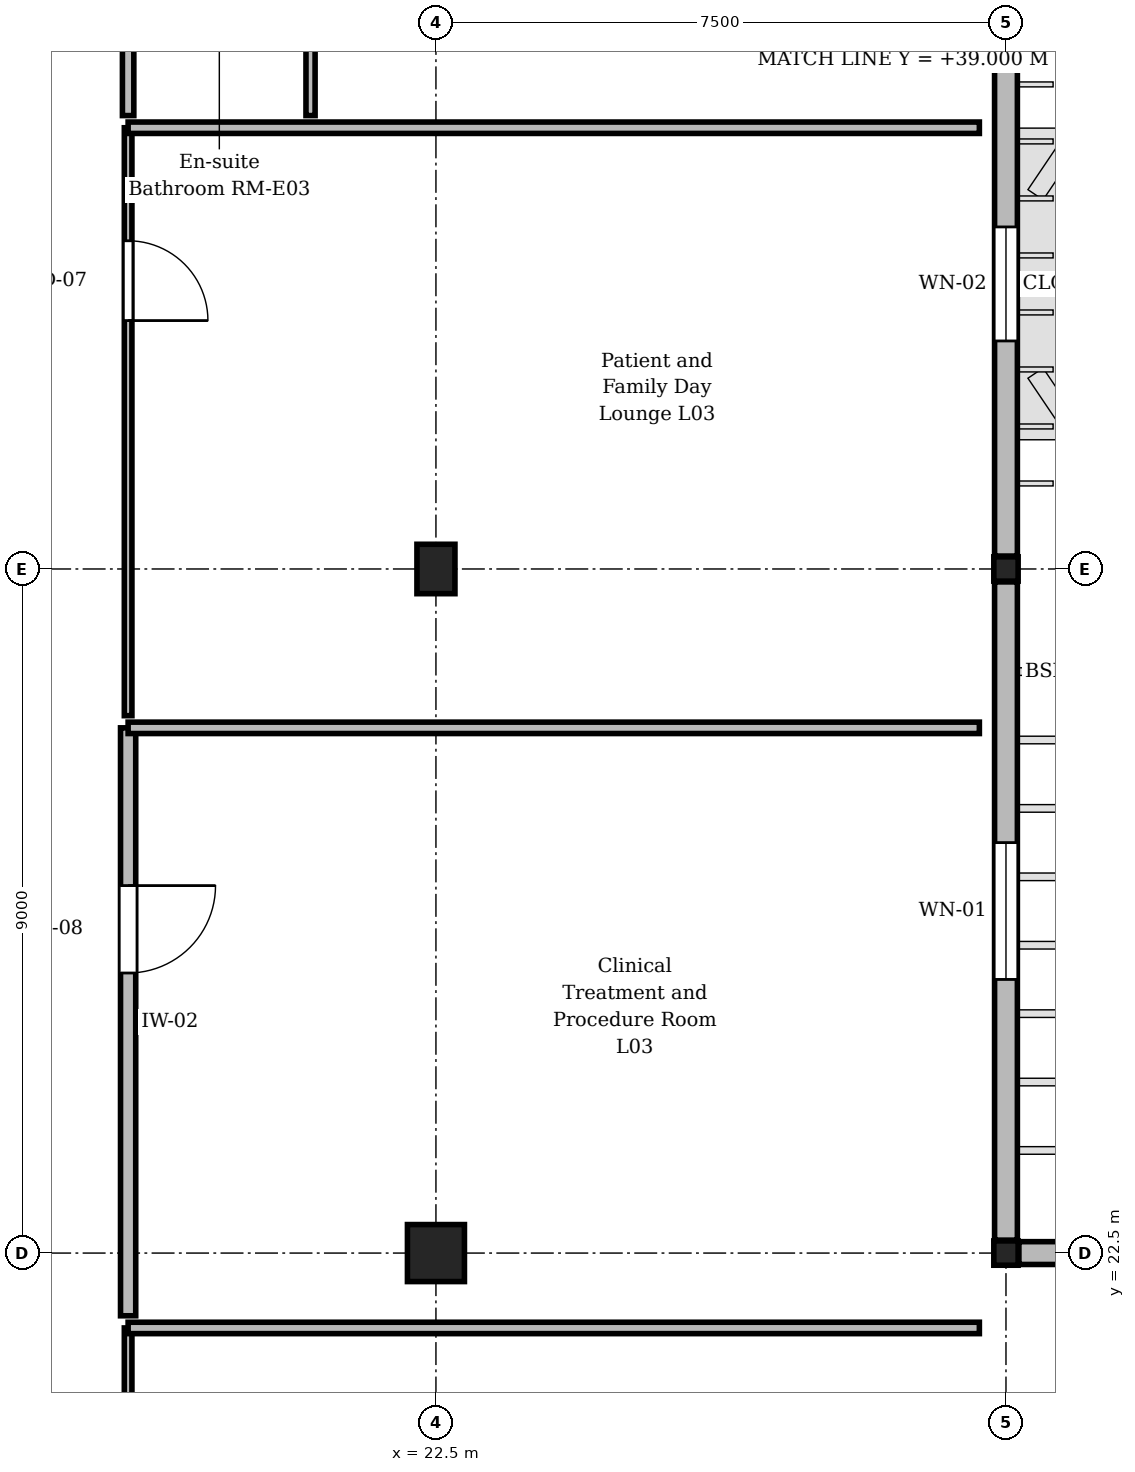
"""IFC4 building model, lengths in metres.
Left out: names, types, materials, properties, quantities, classifications, styles, units other than length and angle.
Written with IfcOpenShell. Run it as: python <this file> out.ifc"""

import sys

from ifc_helpers import new_model, si_unit, direction, frame, frame_2d, origin, origin_2d, place, context, subcontext, project, spatial, rectangle, extrude, element, fill, save


model = new_model("IFC4")
c1 = context("Model", 3, precision=1e-05, world=origin(), true_north=direction((0.0, 1.0)))
c2 = subcontext(c1, "Body", "Model", "MODEL_VIEW")
j1 = project(units=[si_unit("LENGTHUNIT", "METRE"), si_unit("PLANEANGLEUNIT", "RADIAN")], contexts=[c1])
p1 = place(None, origin())
s1 = spatial("IfcSite", under=j1, at=p1, CompositionType="ELEMENT")
p2 = place(p1, origin())
s2 = spatial("IfcBuilding", under=s1, at=p2, CompositionType="ELEMENT")
p3 = place(p2, frame((0.0, 0.0, 14.1)))
s3 = spatial("IfcBuildingStorey", under=s2, at=p3, CompositionType="ELEMENT", Elevation=14.1)
p4 = place(p3, frame((22.5, 22.5, 0.0), z_axis=(0.0, 0.0, 1.0), x_axis=(1.0, 0.0, 0.0)))
e1 = element("IfcColumn", 1, at=p4, inside=s3, PredefinedType="COLUMN", context=c2, shape_type="SweptSolid", body=[
    extrude(rectangle(XDim=0.75, YDim=0.75, at=origin_2d()), origin(), (0.0, 0.0, 1.0), 3.75),
])
p5 = place(p3, frame((22.5, 31.5, 0.0), z_axis=(0.0, 0.0, 1.0), x_axis=(1.0, 0.0, 0.0)))
e2 = element("IfcColumn", 2, at=p5, inside=s3, PredefinedType="COLUMN", context=c2, shape_type="SweptSolid", body=[
    extrude(rectangle(XDim=0.5, YDim=0.65, at=origin_2d()), origin(), (0.0, 0.0, 1.0), 3.75),
])
for number, where, z_axis, x_axis in (
    (3, (30.0, 22.5, 0.0), (0.0, 0.0, 1.0), (1.0, 0.0, 0.0)),
    (4, (30.0, 31.5, 0.0), (0.0, 0.0, 1.0), (1.0, 0.0, 0.0)),
):
    element("IfcColumn", number, at=place(p3, frame(where, z_axis=z_axis, x_axis=x_axis)), inside=s3, PredefinedType="COLUMN", context=c2, shape_type="SweptSolid", body=[
        extrude(rectangle(XDim=0.32, YDim=0.32, at=origin_2d()), origin(), (0.0, 0.0, 1.0), 3.75),
    ])
p6 = place(p3, frame((30.0, 31.33, 0.0), z_axis=(0.0, 0.0, 1.0), x_axis=(0.0, -1.0, 0.0)))
e5 = element("IfcWall", 5, at=p6, inside=s3, PredefinedType="STANDARD", context=c2, shape_type="SweptSolid", body=[
    extrude(rectangle(XDim=8.66, YDim=0.3, at=frame_2d((4.33, 0.0))), origin(), (0.0, 0.0, 1.0), 2.92),
])
p7 = place(p6, frame((3.43, 0.0, 0.9)))
e6 = element("IfcOpeningElement", 6, at=p7, cuts=e5, PredefinedType="OPENING", context=c2, shape_type="SweptSolid", body=[
    extrude(rectangle(XDim=1.8, YDim=1.74, at=frame_2d((0.9, 0.87))), frame((0.0, 0.16, 0.0), z_axis=(0.0, -1.0, 0.0), x_axis=(1.0, 0.0, 0.0)), (0.0, 0.0, 1.0), 0.32),
])
p8 = place(p3, frame((30.0, 38.83, 0.0), z_axis=(0.0, 0.0, 1.0), x_axis=(0.0, -1.0, 0.0)))
e7 = element("IfcWall", 7, at=p8, inside=s3, PredefinedType="STANDARD", context=c2, shape_type="SweptSolid", body=[
    extrude(rectangle(XDim=7.16, YDim=0.3, at=frame_2d((3.58, 0.0))), origin(), (0.0, 0.0, 1.0), 2.87),
])
p9 = place(p8, frame((2.83, 0.0, 0.9)))
e8 = element("IfcOpeningElement", 8, at=p9, cuts=e7, PredefinedType="OPENING", context=c2, shape_type="SweptSolid", body=[
    extrude(rectangle(XDim=1.5, YDim=1.69, at=frame_2d((0.75, 0.845))), frame((0.0, 0.16, 0.0), z_axis=(0.0, -1.0, 0.0), x_axis=(1.0, 0.0, 0.0)), (0.0, 0.0, 1.0), 0.32),
])
p10 = place(p3, frame((30.17, 22.5, 0.0), z_axis=(0.0, 0.0, 1.0), x_axis=(1.0, 0.0, 0.0)))
e9 = element("IfcWall", 9, at=p10, inside=s3, PredefinedType="STANDARD", context=c2, shape_type="SweptSolid", body=[
    extrude(rectangle(XDim=7.16, YDim=0.3, at=frame_2d((3.58, 0.0))), origin(), (0.0, 0.0, 1.0), 2.87),
])
p11 = place(p10, frame((2.68, 0.0, 0.9)))
e10 = element("IfcOpeningElement", 10, at=p11, cuts=e9, PredefinedType="OPENING", context=c2, shape_type="SweptSolid", body=[
    extrude(rectangle(XDim=1.8, YDim=1.69, at=frame_2d((0.9, 0.845))), frame((0.0, 0.16, 0.0), z_axis=(0.0, -1.0, 0.0), x_axis=(1.0, 0.0, 0.0)), (0.0, 0.0, 1.0), 0.32),
])
p12 = place(p3, frame((18.45, 21.515, 0.0), z_axis=(0.0, 0.0, 1.0), x_axis=(0.0, -1.0, 0.0)))
e11 = element("IfcWall", 11, at=p12, inside=s3, PredefinedType="PARTITIONING", context=c2, shape_type="SweptSolid", body=[
    extrude(rectangle(XDim=7.735, YDim=0.1, at=frame_2d((3.867, 0.0))), origin(), (0.0, 0.0, 1.0), 3.455),
])
p13 = place(p12, frame((2.075, 0.0, 0.0)))
e12 = element("IfcOpeningElement", 12, at=p13, cuts=e11, PredefinedType="OPENING", context=c2, shape_type="SweptSolid", body=[
    extrude(rectangle(XDim=1.15, YDim=2.2, at=frame_2d((0.575, 1.1))), frame((0.0, 0.06, 0.0), z_axis=(0.0, -1.0, 0.0), x_axis=(1.0, 0.0, 0.0)), (0.0, 0.0, 1.0), 0.12),
])
p14 = place(p3, frame((18.45, 29.41, 0.0), z_axis=(0.0, 0.0, 1.0), x_axis=(0.0, -1.0, 0.0)))
e13 = element("IfcWall", 13, at=p14, inside=s3, PredefinedType="STANDARD", context=c2, shape_type="SweptSolid", body=[
    extrude(rectangle(XDim=7.735, YDim=0.2, at=frame_2d((3.867, 0.0))), origin(), (0.0, 0.0, 1.0), 3.055),
])
p15 = place(p14, frame((2.075, 0.0, 0.0)))
e14 = element("IfcOpeningElement", 14, at=p15, cuts=e13, PredefinedType="OPENING", context=c2, shape_type="SweptSolid", body=[
    extrude(rectangle(XDim=1.15, YDim=2.2, at=frame_2d((0.575, 1.1))), frame((0.0, 0.11, 0.0), z_axis=(0.0, -1.0, 0.0), x_axis=(1.0, 0.0, 0.0)), (0.0, 0.0, 1.0), 0.22),
])
p16 = place(p3, frame((18.45, 37.305, 0.0), z_axis=(0.0, 0.0, 1.0), x_axis=(0.0, -1.0, 0.0)))
e15 = element("IfcWall", 15, at=p16, inside=s3, PredefinedType="PARTITIONING", context=c2, shape_type="SweptSolid", body=[
    extrude(rectangle(XDim=7.735, YDim=0.1, at=frame_2d((3.867, 0.0))), origin(), (0.0, 0.0, 1.0), 3.055),
])
p17 = place(p16, frame((1.487, 0.0, 0.0)))
e16 = element("IfcOpeningElement", 16, at=p17, cuts=e15, PredefinedType="OPENING", context=c2, shape_type="SweptSolid", body=[
    extrude(rectangle(XDim=1.05, YDim=2.2, at=frame_2d((0.525, 1.1))), frame((0.0, 0.06, 0.0), z_axis=(0.0, -1.0, 0.0), x_axis=(1.0, 0.0, 0.0)), (0.0, 0.0, 1.0), 0.12),
])
p18 = place(p3, frame((18.45, 45.2, 0.0), z_axis=(0.0, 0.0, 1.0), x_axis=(0.0, -1.0, 0.0)))
e17 = element("IfcWall", 17, at=p18, inside=s3, PredefinedType="PARTITIONING", context=c2, shape_type="SweptSolid", body=[
    extrude(rectangle(XDim=7.735, YDim=0.15, at=frame_2d((3.867, 0.0))), origin(), (0.0, 0.0, 1.0), 3.455),
])
p19 = place(p18, frame((2.015, 0.0, 0.0)))
e18 = element("IfcOpeningElement", 18, at=p19, cuts=e17, PredefinedType="OPENING", context=c2, shape_type="SweptSolid", body=[
    extrude(rectangle(XDim=1.35, YDim=2.25, at=frame_2d((0.675, 1.125))), frame((0.0, 0.085, 0.0), z_axis=(0.0, -1.0, 0.0), x_axis=(1.0, 0.0, 0.0)), (0.0, 0.0, 1.0), 0.17),
])
p20 = place(p3, frame((20.85, 37.465, 0.0), z_axis=(0.0, 0.0, 1.0), x_axis=(0.0, 1.0, 0.0)))
e19 = element("IfcWall", 19, at=p20, inside=s3, PredefinedType="PARTITIONING", context=c2, shape_type="SweptSolid", body=[
    extrude(rectangle(XDim=2.0, YDim=0.12, at=frame_2d((1.0, 0.0))), origin(), (0.0, 0.0, 1.0), 3.455),
])
for number, where, z_axis, x_axis in (
    (20, (18.45, 21.515, 0.0), (0.0, 0.0, 1.0), (1.0, 0.0, 0.0)),
    (21, (18.45, 29.41, 0.0), (0.0, 0.0, 1.0), (1.0, 0.0, 0.0)),
    (22, (18.45, 37.305, 0.0), (0.0, 0.0, 1.0), (1.0, 0.0, 0.0)),
):
    element("IfcWall", number, at=place(p3, frame(where, z_axis=z_axis, x_axis=x_axis)), inside=s3, PredefinedType="PARTITIONING", context=c2, shape_type="SweptSolid", body=[
        extrude(rectangle(XDim=11.2, YDim=0.15, at=frame_2d((5.6, 0.0))), origin(), (0.0, 0.0, 1.0), 3.455),
    ])
p21 = place(p7, origin())
e23 = element("IfcWindow", 23, at=p21, inside=s3, PartitioningType="SINGLE_PANEL", PredefinedType="WINDOW", context=c2, shape_type="SweptSolid", body=[
    extrude(rectangle(XDim=1.8, YDim=1.74, at=frame_2d((0.9, 0.87))), frame((0.0, 0.03, 0.0), z_axis=(0.0, -1.0, 0.0), x_axis=(1.0, 0.0, 0.0)), (0.0, 0.0, 1.0), 0.06),
])
fill(e6, e23)
p22 = place(p9, origin())
e24 = element("IfcWindow", 24, at=p22, inside=s3, PartitioningType="SINGLE_PANEL", PredefinedType="WINDOW", context=c2, shape_type="SweptSolid", body=[
    extrude(rectangle(XDim=1.5, YDim=1.69, at=frame_2d((0.75, 0.845))), frame((0.0, 0.03, 0.0), z_axis=(0.0, -1.0, 0.0), x_axis=(1.0, 0.0, 0.0)), (0.0, 0.0, 1.0), 0.06),
])
fill(e8, e24)
p23 = place(p15, origin())
e25 = element("IfcDoor", 25, at=p23, inside=s3, OperationType="SINGLE_SWING_LEFT", PredefinedType="DOOR", context=c2, shape_type="SweptSolid", body=[
    extrude(rectangle(XDim=1.15, YDim=2.2, at=frame_2d((0.575, 1.1))), frame((0.0, 0.025, 0.0), z_axis=(0.0, -1.0, 0.0), x_axis=(1.0, 0.0, 0.0)), (0.0, 0.0, 1.0), 0.05),
])
fill(e14, e25)
p24 = place(p17, origin())
e26 = element("IfcDoor", 26, at=p24, inside=s3, OperationType="SINGLE_SWING_RIGHT", PredefinedType="DOOR", context=c2, shape_type="SweptSolid", body=[
    extrude(rectangle(XDim=1.05, YDim=2.2, at=frame_2d((0.525, 1.1))), frame((0.0, 0.025, 0.0), z_axis=(0.0, -1.0, 0.0), x_axis=(1.0, 0.0, 0.0)), (0.0, 0.0, 1.0), 0.05),
])
fill(e16, e26)
save(model, sys.argv[1])
